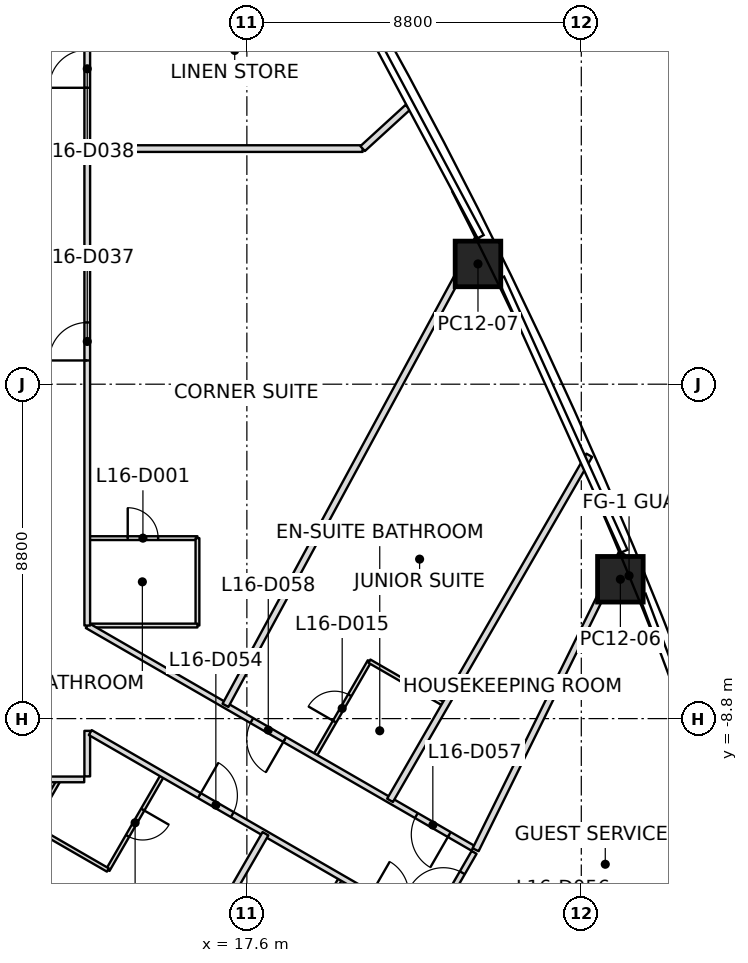
"""IFC4 building model, lengths in metres.
Left out: names, types, materials, properties, quantities, classifications, styles, units other than length and angle.
Written with IfcOpenShell. Run it as: python <this file> out.ifc"""

import sys

from ifc_helpers import new_model, si_unit, direction, frame, frame_2d, origin, origin_2d, place, context, subcontext, project, spatial, rectangle, extrude, element, fill, save


model = new_model("IFC4")
c1 = context("Model", 3, precision=1e-05, world=origin(), true_north=direction((0.0, 1.0)))
c2 = subcontext(c1, "Body", "Model", "MODEL_VIEW")
j1 = project(units=[si_unit("LENGTHUNIT", "METRE"), si_unit("PLANEANGLEUNIT", "RADIAN")], contexts=[c1])
p1 = place(None, origin())
s1 = spatial("IfcSite", under=j1, at=p1, CompositionType="ELEMENT")
p2 = place(p1, origin())
s2 = spatial("IfcBuilding", under=s1, at=p2, CompositionType="ELEMENT")
p3 = place(p2, frame((0.0, 0.0, 81.3)))
s3 = spatial("IfcBuildingStorey", under=s2, at=p3, CompositionType="ELEMENT", Elevation=81.3)
p4 = place(p3, frame((27.428, -5.133, 0.0), z_axis=(-0.019460669214, 0.010950749456, 0.999750650632), x_axis=(-0.381024023637, 0.924398704075, -0.017542215233)))
e1 = element("IfcColumn", 1, at=p4, inside=s3, PredefinedType="COLUMN", context=c2, shape_type="SweptSolid", body=[
    extrude(rectangle(XDim=1.2, YDim=1.2, at=origin_2d()), origin(), (0.0, 0.0, 1.0), 3.701),
])
p5 = place(p3, frame((23.681, 3.165, 0.0), z_axis=(-0.015306644787, 0.002309192102, 0.99988017995), x_axis=(-0.441466655393, 0.897234204469, -0.008830317467)))
e2 = element("IfcColumn", 2, at=p5, inside=s3, PredefinedType="COLUMN", context=c2, shape_type="SweptSolid", body=[
    extrude(rectangle(XDim=1.2, YDim=1.2, at=origin_2d()), origin(), (0.0, 0.0, 1.0), 3.7),
])
p6 = place(p3, frame((18.089, -11.83, 0.0), z_axis=(0.0, 0.0, 1.0), x_axis=(-0.500005634617, -0.866022150612, 0.0)))
e3 = element("IfcWall", 3, at=p6, inside=s3, PredefinedType="PARTITIONING", context=c2, shape_type="SweptSolid", body=[
    extrude(rectangle(XDim=9.378, YDim=0.175, at=frame_2d((4.689, 0.0))), origin(), (0.0, 0.0, 1.0), 3.093),
])
p7 = place(p3, frame((13.4, 6.2, 0.0), z_axis=(0.0, 0.0, 1.0), x_axis=(1.0, 0.0, 0.0)))
e4 = element("IfcWall", 4, at=p7, inside=s3, PredefinedType="PARTITIONING", context=c2, shape_type="SweptSolid", body=[
    extrude(rectangle(XDim=7.246, YDim=0.175, at=frame_2d((3.623, 0.0))), origin(), (0.0, 0.0, 1.0), 3.017),
])
p8 = place(p3, frame((20.646, 6.2, 0.0), z_axis=(0.0, 0.0, 1.0), x_axis=(0.738108499595, 0.674682030905, 0.0)))
e5 = element("IfcWall", 5, at=p8, inside=s3, PredefinedType="PARTITIONING", context=c2, shape_type="SweptSolid", body=[
    extrude(rectangle(XDim=1.613, YDim=0.175, at=frame_2d((0.806, 0.0))), origin(), (0.0, 0.0, 1.0), 2.934),
])
p9 = place(p3, frame((23.685, 3.826, 0.0), z_axis=(0.0, 0.0, 1.0), x_axis=(-0.476143437268, -0.879367629121, 0.0)))
e6 = element("IfcWall", 6, at=p9, inside=s3, PredefinedType="PARTITIONING", context=c2, shape_type="SweptSolid", body=[
    extrude(rectangle(XDim=13.962, YDim=0.175, at=frame_2d((6.981, 0.0))), origin(), (0.0, 0.0, 1.0), 2.947),
])
p10 = place(p3, frame((26.61, -1.871, 0.0), z_axis=(0.0, 0.0, 1.0), x_axis=(-0.500003296978, -0.866023500265, 0.0)))
e7 = element("IfcWall", 7, at=p10, inside=s3, PredefinedType="PARTITIONING", context=c2, shape_type="SweptSolid", body=[
    extrude(rectangle(XDim=10.485, YDim=0.175, at=frame_2d((5.242, 0.0))), origin(), (0.0, 0.0, 1.0), 2.934),
])
p11 = place(p3, frame((23.619, -12.251, 0.0), z_axis=(0.0, 0.0, 1.0), x_axis=(0.442347207514, 0.896843881623, 0.0)))
e8 = element("IfcWall", 8, at=p11, inside=s3, PredefinedType="PARTITIONING", context=c2, shape_type="SweptSolid", body=[
    extrude(rectangle(XDim=8.701, YDim=0.175, at=frame_2d((4.351, 0.0))), origin(), (0.0, 0.0, 1.0), 3.15),
])
p12 = place(p3, frame((-13.32, -10.4, 0.0), z_axis=(0.0, 0.0, 1.0), x_axis=(1.0, 0.0, 0.0)))
e9 = element("IfcWall", 9, at=p12, inside=s3, PredefinedType="PARTITIONING", context=c2, shape_type="SweptSolid", body=[
    extrude(rectangle(XDim=26.64, YDim=0.15, at=frame_2d((13.32, 0.0))), origin(), (0.0, 0.0, 1.0), 2.947),
])
p13 = place(p12, frame((7.72, 0.0, 0.0)))
e10 = element("IfcOpeningElement", 10, at=p13, cuts=e9, PredefinedType="OPENING", context=c2, shape_type="SweptSolid", body=[
    extrude(rectangle(XDim=1.0, YDim=2.1, at=frame_2d((0.5, 1.05))), frame((0.0, 0.075, 0.0), z_axis=(0.0, -1.0, 0.0), x_axis=(1.0, 0.0, 0.0)), (0.0, 0.0, 1.0), 0.15),
])
p14 = place(p12, frame((11.92, 0.0, 0.0)))
e11 = element("IfcOpeningElement", 11, at=p14, cuts=e9, PredefinedType="OPENING", context=c2, shape_type="SweptSolid", body=[
    extrude(rectangle(XDim=1.0, YDim=2.1, at=frame_2d((0.5, 1.05))), frame((0.0, 0.075, 0.0), z_axis=(0.0, -1.0, 0.0), x_axis=(1.0, 0.0, 0.0)), (0.0, 0.0, 1.0), 0.15),
])
p15 = place(p12, frame((16.52, 0.0, 0.0)))
e12 = element("IfcOpeningElement", 12, at=p15, cuts=e9, PredefinedType="OPENING", context=c2, shape_type="SweptSolid", body=[
    extrude(rectangle(XDim=1.0, YDim=2.1, at=frame_2d((0.5, 1.05))), frame((0.0, 0.075, 0.0), z_axis=(0.0, -1.0, 0.0), x_axis=(1.0, 0.0, 0.0)), (0.0, 0.0, 1.0), 0.15),
])
p16 = place(p12, frame((21.12, 0.0, 0.0)))
e13 = element("IfcOpeningElement", 13, at=p16, cuts=e9, PredefinedType="OPENING", context=c2, shape_type="SweptSolid", body=[
    extrude(rectangle(XDim=1.0, YDim=2.1, at=frame_2d((0.5, 1.05))), frame((0.0, 0.075, 0.0), z_axis=(0.0, -1.0, 0.0), x_axis=(1.0, 0.0, 0.0)), (0.0, 0.0, 1.0), 0.15),
])
p17 = place(p3, frame((13.4, -10.32, 0.0), z_axis=(0.0, 0.0, 1.0), x_axis=(0.0, 1.0, 0.0)))
e14 = element("IfcWall", 14, at=p17, inside=s3, PredefinedType="PARTITIONING", context=c2, shape_type="SweptSolid", body=[
    extrude(rectangle(XDim=1.198, YDim=0.15, at=frame_2d((0.599, 0.0))), origin(), (0.0, 0.0, 1.0), 2.797),
])
p18 = place(p3, frame((13.479, -9.168, 0.0), z_axis=(0.0, 0.0, 1.0), x_axis=(0.866025631158, -0.499999606177, 0.0)))
e15 = element("IfcWall", 15, at=p18, inside=s3, PredefinedType="PARTITIONING", context=c2, shape_type="SweptSolid", body=[
    extrude(rectangle(XDim=10.243, YDim=0.15, at=frame_2d((5.122, 0.0))), origin(), (0.0, 0.0, 1.0), 2.797),
])
p19 = place(p18, frame((3.316, 0.0, 0.0)))
e16 = element("IfcOpeningElement", 16, at=p19, cuts=e15, PredefinedType="OPENING", context=c2, shape_type="SweptSolid", body=[
    extrude(rectangle(XDim=1.0, YDim=2.1, at=frame_2d((0.5, 1.05))), frame((0.0, 0.075, 0.0), z_axis=(0.0, -1.0, 0.0), x_axis=(1.0, 0.0, 0.0)), (0.0, 0.0, 1.0), 0.15),
])
p20 = place(p18, frame((8.523, 0.0, 0.0)))
e17 = element("IfcOpeningElement", 17, at=p20, cuts=e15, PredefinedType="OPENING", context=c2, shape_type="SweptSolid", body=[
    extrude(rectangle(XDim=1.0, YDim=2.1, at=frame_2d((0.5, 1.05))), frame((0.0, 0.075, 0.0), z_axis=(0.0, -1.0, 0.0), x_axis=(1.0, 0.0, 0.0)), (0.0, 0.0, 1.0), 0.15),
])
p21 = place(p3, frame((23.55, -12.211, 0.0), z_axis=(0.0, 0.0, 1.0), x_axis=(-0.866028447449, 0.499994728181, 0.0)))
e18 = element("IfcWall", 18, at=p21, inside=s3, PredefinedType="PARTITIONING", context=c2, shape_type="SweptSolid", body=[
    extrude(rectangle(XDim=11.72, YDim=0.15, at=frame_2d((5.86, 0.0))), origin(), (0.0, 0.0, 1.0), 2.947),
])
p22 = place(p21, frame((0.72, 0.0, 0.0)))
e19 = element("IfcOpeningElement", 19, at=p22, cuts=e18, PredefinedType="OPENING", context=c2, shape_type="SweptSolid", body=[
    extrude(rectangle(XDim=1.0, YDim=2.1, at=frame_2d((0.5, 1.05))), frame((0.0, 0.075, 0.0), z_axis=(0.0, -1.0, 0.0), x_axis=(1.0, 0.0, 0.0)), (0.0, 0.0, 1.0), 0.15),
])
p23 = place(p21, frame((5.72, 0.0, 0.0)))
e20 = element("IfcOpeningElement", 20, at=p23, cuts=e18, PredefinedType="OPENING", context=c2, shape_type="SweptSolid", body=[
    extrude(rectangle(XDim=1.0, YDim=2.1, at=frame_2d((0.5, 1.05))), frame((0.0, 0.075, 0.0), z_axis=(0.0, -1.0, 0.0), x_axis=(1.0, 0.0, 0.0)), (0.0, 0.0, 1.0), 0.15),
])
p24 = place(p3, frame((13.4, -6.351, 0.0), z_axis=(0.0, 0.0, 1.0), x_axis=(0.0, 1.0, 0.0)))
e21 = element("IfcWall", 21, at=p24, inside=s3, PredefinedType="PARTITIONING", context=c2, shape_type="SweptSolid", body=[
    extrude(rectangle(XDim=16.671, YDim=0.15, at=frame_2d((8.335, 0.0))), origin(), (0.0, 0.0, 1.0), 2.947),
])
p25 = place(p24, frame((6.976, 0.0, 0.0)))
e22 = element("IfcOpeningElement", 22, at=p25, cuts=e21, PredefinedType="OPENING", context=c2, shape_type="SweptSolid", body=[
    extrude(rectangle(XDim=1.0, YDim=2.1, at=frame_2d((0.5, 1.05))), frame((0.0, 0.075, 0.0), z_axis=(0.0, -1.0, 0.0), x_axis=(1.0, 0.0, 0.0)), (0.0, 0.0, 1.0), 0.15),
])
p26 = place(p24, frame((14.151, 0.0, 0.0)))
e23 = element("IfcOpeningElement", 23, at=p26, cuts=e21, PredefinedType="OPENING", context=c2, shape_type="SweptSolid", body=[
    extrude(rectangle(XDim=1.0, YDim=2.1, at=frame_2d((0.5, 1.05))), frame((0.0, 0.075, 0.0), z_axis=(0.0, -1.0, 0.0), x_axis=(1.0, 0.0, 0.0)), (0.0, 0.0, 1.0), 0.15),
])
p27 = place(p3, frame((22.459, -14.26, 0.0), z_axis=(0.0, 0.0, 1.0), x_axis=(0.49994888933, 0.866054910533, 0.0)))
e24 = element("IfcWall", 24, at=p27, inside=s3, PredefinedType="PARTITIONING", context=c2, shape_type="SweptSolid", body=[
    extrude(rectangle(XDim=2.24, YDim=0.15, at=frame_2d((1.12, 0.0))), origin(), (0.0, 0.0, 1.0), 2.797),
])
p28 = place(p27, frame((0.62, 0.0, 0.0)))
e25 = element("IfcOpeningElement", 25, at=p28, cuts=e24, PredefinedType="OPENING", context=c2, shape_type="SweptSolid", body=[
    extrude(rectangle(XDim=1.0, YDim=2.1, at=frame_2d((0.5, 1.05))), frame((0.0, 0.075, 0.0), z_axis=(0.0, -1.0, 0.0), x_axis=(1.0, 0.0, 0.0)), (0.0, 0.0, 1.0), 0.15),
])
p29 = place(p3, frame((15.377, -10.298, 0.0), z_axis=(0.0, 0.0, 1.0), x_axis=(-0.499999802827, -0.866025517622, 0.0)))
e26 = element("IfcWall", 26, at=p29, inside=s3, PredefinedType="PARTITIONING", context=c2, shape_type="SweptSolid", body=[
    extrude(rectangle(XDim=2.87, YDim=0.1, at=frame_2d((1.435, 0.0))), origin(), (0.0, 0.0, 1.0), 2.797),
])
p30 = place(p29, frame((1.035, 0.0, 0.0)))
e27 = element("IfcOpeningElement", 27, at=p30, cuts=e26, PredefinedType="OPENING", context=c2, shape_type="SweptSolid", body=[
    extrude(rectangle(XDim=0.8, YDim=2.1, at=frame_2d((0.4, 1.05))), frame((0.0, 0.05, 0.0), z_axis=(0.0, -1.0, 0.0), x_axis=(1.0, 0.0, 0.0)), (0.0, 0.0, 1.0), 0.1),
])
p31 = place(p3, frame((13.942, -12.784, 0.0), z_axis=(0.0, 0.0, 1.0), x_axis=(-0.866007057882, 0.500031774688, 0.0)))
e28 = element("IfcWall", 28, at=p31, inside=s3, PredefinedType="PARTITIONING", context=c2, shape_type="SweptSolid", body=[
    extrude(rectangle(XDim=2.3, YDim=0.1, at=frame_2d((1.15, 0.0))), origin(), (0.0, 0.0, 1.0), 3.15),
])
p32 = place(p3, frame((11.95, -11.634, 0.0), z_axis=(0.0, 0.0, 1.0), x_axis=(0.500087364259, 0.86597495813, 0.0)))
e29 = element("IfcWall", 29, at=p32, inside=s3, PredefinedType="PARTITIONING", context=c2, shape_type="SweptSolid", body=[
    extrude(rectangle(XDim=1.39, YDim=0.1, at=frame_2d((0.695, 0.0))), origin(), (0.0, 0.0, 1.0), 3.15),
])
p33 = place(p3, frame((13.43, -4.051, 0.0), z_axis=(0.0, 0.0, 1.0), x_axis=(1.0, 0.0, 0.0)))
e30 = element("IfcWall", 30, at=p33, inside=s3, PredefinedType="PARTITIONING", context=c2, shape_type="SweptSolid", body=[
    extrude(rectangle(XDim=2.87, YDim=0.1, at=frame_2d((1.435, 0.0))), origin(), (0.0, 0.0, 1.0), 2.947),
])
p34 = place(p33, frame((1.035, 0.0, 0.0)))
e31 = element("IfcOpeningElement", 31, at=p34, cuts=e30, PredefinedType="OPENING", context=c2, shape_type="SweptSolid", body=[
    extrude(rectangle(XDim=0.8, YDim=2.1, at=frame_2d((0.4, 1.05))), frame((0.0, 0.05, 0.0), z_axis=(0.0, -1.0, 0.0), x_axis=(1.0, 0.0, 0.0)), (0.0, 0.0, 1.0), 0.1),
])
p35 = place(p3, frame((16.3, -4.051, 0.0), z_axis=(0.0, 0.0, 1.0), x_axis=(0.0, -1.0, 0.0)))
e32 = element("IfcWall", 32, at=p35, inside=s3, PredefinedType="PARTITIONING", context=c2, shape_type="SweptSolid", body=[
    extrude(rectangle(XDim=2.3, YDim=0.1, at=frame_2d((1.15, 0.0))), origin(), (0.0, 0.0, 1.0), 3.15),
])
p36 = place(p3, frame((16.3, -6.351, 0.0), z_axis=(0.0, 0.0, 1.0), x_axis=(-1.0, 0.0, 0.0)))
e33 = element("IfcWall", 33, at=p36, inside=s3, PredefinedType="PARTITIONING", context=c2, shape_type="SweptSolid", body=[
    extrude(rectangle(XDim=2.84, YDim=0.1, at=frame_2d((1.42, 0.0))), origin(), (0.0, 0.0, 1.0), 3.15),
])
p37 = place(p3, frame((20.066, -13.006, 0.0), z_axis=(0.0, 0.0, 1.0), x_axis=(-0.500036638401, -0.866004249561, 0.0)))
e34 = element("IfcWall", 34, at=p37, inside=s3, PredefinedType="PARTITIONING", context=c2, shape_type="SweptSolid", body=[
    extrude(rectangle(XDim=2.87, YDim=0.1, at=frame_2d((1.435, 0.0))), origin(), (0.0, 0.0, 1.0), 3.15),
])
p38 = place(p37, frame((1.035, 0.0, 0.0)))
e35 = element("IfcOpeningElement", 35, at=p38, cuts=e34, PredefinedType="OPENING", context=c2, shape_type="SweptSolid", body=[
    extrude(rectangle(XDim=0.8, YDim=2.1, at=frame_2d((0.4, 1.05))), frame((0.0, 0.05, 0.0), z_axis=(0.0, -1.0, 0.0), x_axis=(1.0, 0.0, 0.0)), (0.0, 0.0, 1.0), 0.1),
])
p39 = place(p3, frame((19.391, -9.775, 0.0), z_axis=(0.0, 0.0, 1.0), x_axis=(0.499999802827, 0.866025517622, 0.0)))
e36 = element("IfcWall", 36, at=p39, inside=s3, PredefinedType="PARTITIONING", context=c2, shape_type="SweptSolid", body=[
    extrude(rectangle(XDim=2.87, YDim=0.1, at=frame_2d((1.435, 0.0))), origin(), (0.0, 0.0, 1.0), 3.15),
])
p40 = place(p39, frame((1.035, 0.0, 0.0)))
e37 = element("IfcOpeningElement", 37, at=p40, cuts=e36, PredefinedType="OPENING", context=c2, shape_type="SweptSolid", body=[
    extrude(rectangle(XDim=0.8, YDim=2.1, at=frame_2d((0.4, 1.05))), frame((0.0, 0.05, 0.0), z_axis=(0.0, -1.0, 0.0), x_axis=(1.0, 0.0, 0.0)), (0.0, 0.0, 1.0), 0.1),
])
p41 = place(p3, frame((20.826, -7.289, 0.0), z_axis=(0.0, 0.0, 1.0), x_axis=(0.866017224141, -0.500014167291, 0.0)))
e38 = element("IfcWall", 38, at=p41, inside=s3, PredefinedType="PARTITIONING", context=c2, shape_type="SweptSolid", body=[
    extrude(rectangle(XDim=2.27, YDim=0.1, at=frame_2d((1.135, 0.0))), origin(), (0.0, 0.0, 1.0), 3.15),
])
p42 = place(p25, origin())
e39 = element("IfcDoor", 39, at=p42, inside=s3, OperationType="SINGLE_SWING_LEFT", PredefinedType="DOOR", context=c2, shape_type="SweptSolid", body=[
    extrude(rectangle(XDim=1.0, YDim=2.1, at=frame_2d((0.5, 1.05))), frame((0.0, 0.025, 0.0), z_axis=(0.0, -1.0, 0.0), x_axis=(1.0, 0.0, 0.0)), (0.0, 0.0, 1.0), 0.05),
])
fill(e22, e39)
p43 = place(p34, origin())
e40 = element("IfcDoor", 40, at=p43, inside=s3, OperationType="SINGLE_SWING_LEFT", PredefinedType="DOOR", context=c2, shape_type="SweptSolid", body=[
    extrude(rectangle(XDim=0.8, YDim=2.1, at=frame_2d((0.4, 1.05))), frame((0.0, 0.025, 0.0), z_axis=(0.0, -1.0, 0.0), x_axis=(1.0, 0.0, 0.0)), (0.0, 0.0, 1.0), 0.05),
])
fill(e31, e40)
p44 = place(p26, origin())
e41 = element("IfcDoor", 41, at=p44, inside=s3, OperationType="SINGLE_SWING_LEFT", PredefinedType="DOOR", context=c2, shape_type="SweptSolid", body=[
    extrude(rectangle(XDim=1.0, YDim=2.1, at=frame_2d((0.5, 1.05))), frame((0.0, 0.025, 0.0), z_axis=(0.0, -1.0, 0.0), x_axis=(1.0, 0.0, 0.0)), (0.0, 0.0, 1.0), 0.05),
])
fill(e23, e41)
p45 = place(p19, origin())
e42 = element("IfcDoor", 42, at=p45, inside=s3, OperationType="SINGLE_SWING_LEFT", PredefinedType="DOOR", context=c2, shape_type="SweptSolid", body=[
    extrude(rectangle(XDim=1.0, YDim=2.1, at=frame_2d((0.5, 1.05))), frame((0.0, 0.025, 0.0), z_axis=(0.0, -1.0, 0.0), x_axis=(1.0, 0.0, 0.0)), (0.0, 0.0, 1.0), 0.05),
])
fill(e16, e42)
p46 = place(p30, origin())
e43 = element("IfcDoor", 43, at=p46, inside=s3, OperationType="SINGLE_SWING_LEFT", PredefinedType="DOOR", context=c2, shape_type="SweptSolid", body=[
    extrude(rectangle(XDim=0.8, YDim=2.1, at=frame_2d((0.4, 1.05))), frame((0.0, 0.025, 0.0), z_axis=(0.0, -1.0, 0.0), x_axis=(1.0, 0.0, 0.0)), (0.0, 0.0, 1.0), 0.05),
])
fill(e27, e43)
p47 = place(p28, origin())
e44 = element("IfcDoor", 44, at=p47, inside=s3, OperationType="SINGLE_SWING_RIGHT", PredefinedType="DOOR", context=c2, shape_type="SweptSolid", body=[
    extrude(rectangle(XDim=1.0, YDim=2.1, at=frame_2d((0.5, 1.05))), frame((0.0, 0.025, 0.0), z_axis=(0.0, -1.0, 0.0), x_axis=(1.0, 0.0, 0.0)), (0.0, 0.0, 1.0), 0.05),
])
fill(e25, e44)
p48 = place(p22, origin())
e45 = element("IfcDoor", 45, at=p48, inside=s3, OperationType="SINGLE_SWING_RIGHT", PredefinedType="DOOR", context=c2, shape_type="SweptSolid", body=[
    extrude(rectangle(XDim=1.0, YDim=2.1, at=frame_2d((0.5, 1.05))), frame((0.0, 0.025, 0.0), z_axis=(0.0, -1.0, 0.0), x_axis=(1.0, 0.0, 0.0)), (0.0, 0.0, 1.0), 0.05),
])
fill(e19, e45)
p49 = place(p23, origin())
e46 = element("IfcDoor", 46, at=p49, inside=s3, OperationType="SINGLE_SWING_LEFT", PredefinedType="DOOR", context=c2, shape_type="SweptSolid", body=[
    extrude(rectangle(XDim=1.0, YDim=2.1, at=frame_2d((0.5, 1.05))), frame((0.0, 0.025, 0.0), z_axis=(0.0, -1.0, 0.0), x_axis=(1.0, 0.0, 0.0)), (0.0, 0.0, 1.0), 0.05),
])
fill(e20, e46)
p50 = place(p40, origin())
e47 = element("IfcDoor", 47, at=p50, inside=s3, OperationType="SINGLE_SWING_RIGHT", PredefinedType="DOOR", context=c2, shape_type="SweptSolid", body=[
    extrude(rectangle(XDim=0.8, YDim=2.1, at=frame_2d((0.4, 1.05))), frame((0.0, 0.025, 0.0), z_axis=(0.0, -1.0, 0.0), x_axis=(1.0, 0.0, 0.0)), (0.0, 0.0, 1.0), 0.05),
])
fill(e37, e47)
save(model, sys.argv[1])
